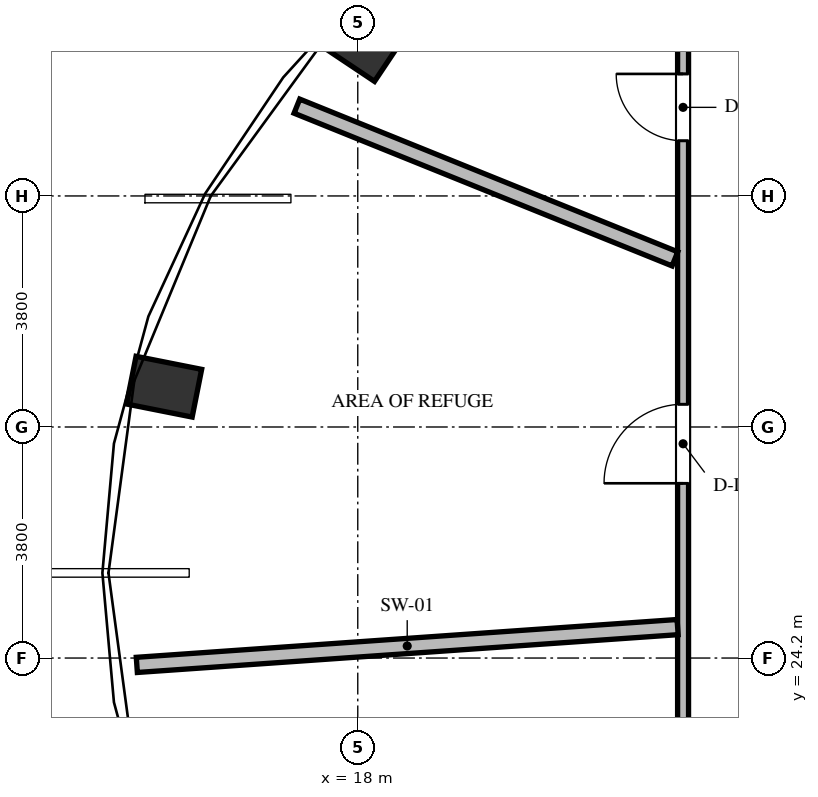
"""IFC4 building model, lengths in metres.
Left out: names, types, materials, properties, quantities, classifications, styles, units other than length and angle.
Written with IfcOpenShell. Run it as: python <this file> out.ifc"""

import sys

from ifc_helpers import new_model, si_unit, direction, frame, frame_2d, origin, origin_2d, place, context, subcontext, project, spatial, rectangle, extrude, element, fill, save


model = new_model("IFC4")
c1 = context("Model", 3, precision=1e-05, world=origin(), true_north=direction((0.0, 1.0)))
c2 = subcontext(c1, "Body", "Model", "MODEL_VIEW")
j1 = project(units=[si_unit("LENGTHUNIT", "METRE"), si_unit("PLANEANGLEUNIT", "RADIAN")], contexts=[c1])
p1 = place(None, origin())
s1 = spatial("IfcSite", under=j1, at=p1, CompositionType="ELEMENT")
p2 = place(p1, origin())
s2 = spatial("IfcBuilding", under=s1, at=p2, CompositionType="ELEMENT")
p3 = place(p2, frame((0.0, 0.0, 245.904)))
s3 = spatial("IfcBuildingStorey", under=s2, at=p3, CompositionType="ELEMENT", Elevation=245.904)
for number, where, z_axis, x_axis in (
    (1, (18.04, 34.323, 0.0), (0.0, 0.0, 1.0), (-0.831, 0.556, 0.0)),
    (2, (14.815, 28.663, 0.0), (0.0, 0.0, 1.0), (-0.981, 0.195, 0.0)),
):
    element("IfcColumn", number, at=place(p3, frame(where, z_axis=z_axis, x_axis=x_axis)), inside=s3, PredefinedType="COLUMN", context=c2, shape_type="SweptSolid", body=[
        extrude(rectangle(XDim=1.1, YDim=0.8, at=origin_2d()), origin(), (0.0, 0.0, 1.0), 5.472),
    ])
p4 = place(p3, frame((23.35, 19.98, 0.0), z_axis=(0.0, 0.0, 1.0), x_axis=(0.0, 1.0, 0.0)))
e3 = element("IfcWall", 3, at=p4, inside=s3, PredefinedType="PARTITIONING", context=c2, shape_type="SweptSolid", body=[
    extrude(rectangle(XDim=16.042, YDim=0.18, at=frame_2d((8.021, 0.0))), origin(), (0.0, 0.0, 1.0), 5.272),
])
p5 = place(p4, frame((1.848, 0.0, 0.0)))
e4 = element("IfcOpeningElement", 4, at=p5, cuts=e3, PredefinedType="OPENING", context=c2, shape_type="SweptSolid", body=[
    extrude(rectangle(XDim=1.3, YDim=2.2, at=frame_2d((0.65, 1.1))), frame((0.0, 0.1, 0.0), z_axis=(0.0, -1.0, 0.0), x_axis=(1.0, 0.0, 0.0)), (0.0, 0.0, 1.0), 0.2),
])
p6 = place(p4, frame((12.727, 0.0, 0.0)))
e5 = element("IfcOpeningElement", 5, at=p6, cuts=e3, PredefinedType="OPENING", context=c2, shape_type="SweptSolid", body=[
    extrude(rectangle(XDim=1.1, YDim=2.15, at=frame_2d((0.55, 1.075))), frame((0.0, 0.1, 0.0), z_axis=(0.0, -1.0, 0.0), x_axis=(1.0, 0.0, 0.0)), (0.0, 0.0, 1.0), 0.2),
])
p7 = place(p4, frame((7.094, 0.0, 0.0)))
e6 = element("IfcOpeningElement", 6, at=p7, cuts=e3, PredefinedType="OPENING", context=c2, shape_type="SweptSolid", body=[
    extrude(rectangle(XDim=1.3, YDim=2.2, at=frame_2d((0.65, 1.1))), frame((0.0, 0.1, 0.0), z_axis=(0.0, -1.0, 0.0), x_axis=(1.0, 0.0, 0.0)), (0.0, 0.0, 1.0), 0.2),
])
p8 = place(p3, frame((23.216, 30.765, 0.0), z_axis=(0.0, 0.0, 1.0), x_axis=(-0.927177883422, 0.374621372179, 0.0)))
e7 = element("IfcWall", 7, at=p8, inside=s3, PredefinedType="SOLIDWALL", context=c2, shape_type="SweptSolid", body=[
    extrude(rectangle(XDim=6.705, YDim=0.25, at=frame_2d((3.353, 0.0))), origin(), (0.0, 0.0, 1.0), 5.272),
])
p9 = place(p3, frame((23.26, 24.709, 0.0), z_axis=(0.0, 0.0, 1.0), x_axis=(-0.997564743509, -0.069746559107, 0.0)))
e8 = element("IfcWall", 8, at=p9, inside=s3, PredefinedType="SOLIDWALL", context=c2, shape_type="SweptSolid", body=[
    extrude(rectangle(XDim=8.916, YDim=0.25, at=frame_2d((4.458, 0.0))), origin(), (0.0, 0.0, 1.0), 5.272),
])
p10 = place(p6, origin())
e9 = element("IfcDoor", 9, at=p10, inside=s3, OperationType="SINGLE_SWING_RIGHT", PredefinedType="DOOR", context=c2, shape_type="SweptSolid", body=[
    extrude(rectangle(XDim=1.1, YDim=2.15, at=frame_2d((0.55, 1.075))), frame((0.0, 0.025, 0.0), z_axis=(0.0, -1.0, 0.0), x_axis=(1.0, 0.0, 0.0)), (0.0, 0.0, 1.0), 0.05),
])
fill(e5, e9)
p11 = place(p7, origin())
e10 = element("IfcDoor", 10, at=p11, inside=s3, OperationType="SINGLE_SWING_LEFT", PredefinedType="DOOR", context=c2, shape_type="SweptSolid", body=[
    extrude(rectangle(XDim=1.3, YDim=2.2, at=frame_2d((0.65, 1.1))), frame((0.0, 0.025, 0.0), z_axis=(0.0, -1.0, 0.0), x_axis=(1.0, 0.0, 0.0)), (0.0, 0.0, 1.0), 0.05),
])
fill(e6, e10)
save(model, sys.argv[1])
